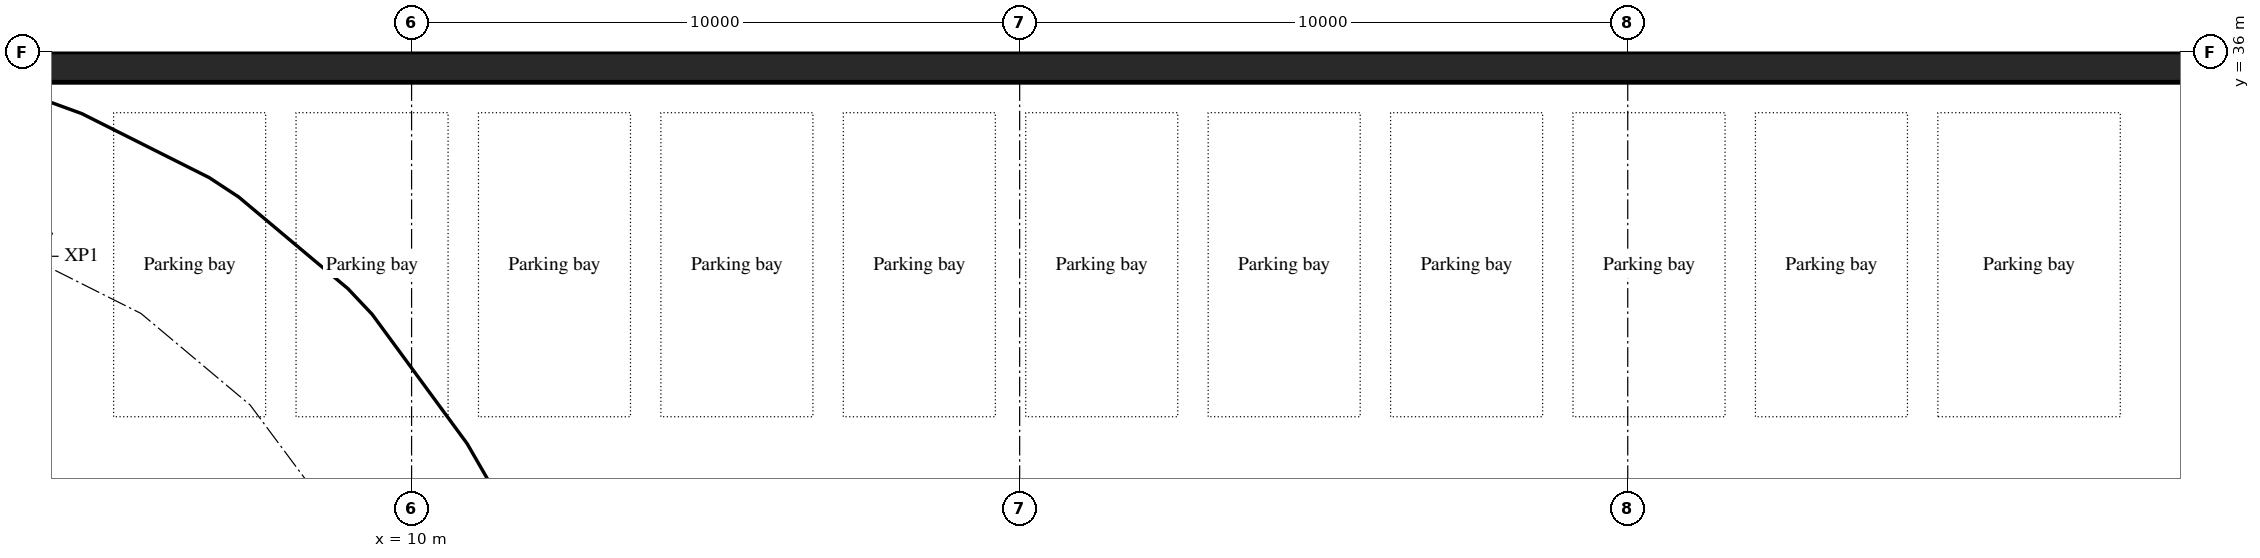
"""IFC4 building model, lengths in metres.
Left out: names, types, materials, properties, quantities, classifications, styles, units other than length and angle.
Written with IfcOpenShell. Run it as: python <this file> out.ifc"""

import sys

from ifc_helpers import new_model, si_unit, direction, frame, frame_2d, origin, place, context, subcontext, project, spatial, rectangle, extrude, element, save


model = new_model("IFC4")
c1 = context("Model", 3, precision=1e-05, world=origin(), true_north=direction((0.0, 1.0)))
c2 = subcontext(c1, "Body", "Model", "MODEL_VIEW")
j1 = project(units=[si_unit("LENGTHUNIT", "METRE"), si_unit("PLANEANGLEUNIT", "RADIAN")], contexts=[c1])
p1 = place(None, origin())
s1 = spatial("IfcSite", under=j1, at=p1, CompositionType="ELEMENT")
p2 = place(p1, origin())
s2 = spatial("IfcBuilding", under=s1, at=p2, CompositionType="ELEMENT")
p3 = place(p2, frame((0.0, 0.0, -8.4)))
s3 = spatial("IfcBuildingStorey", under=s2, at=p3, CompositionType="ELEMENT", Elevation=-8.4)
p4 = place(p3, frame((40.0, 35.75, -0.4), z_axis=(0.0, 0.0, 1.0), x_axis=(-1.0, 0.0, 0.0)))
e1 = element("IfcWall", 1, at=p4, inside=s3, PredefinedType="SOLIDWALL", context=c2, shape_type="SweptSolid", body=[
    extrude(rectangle(XDim=80.0, YDim=0.5, at=frame_2d((40.0, 0.0))), origin(), (0.0, 0.0, 1.0), 4.22),
])
save(model, sys.argv[1])
